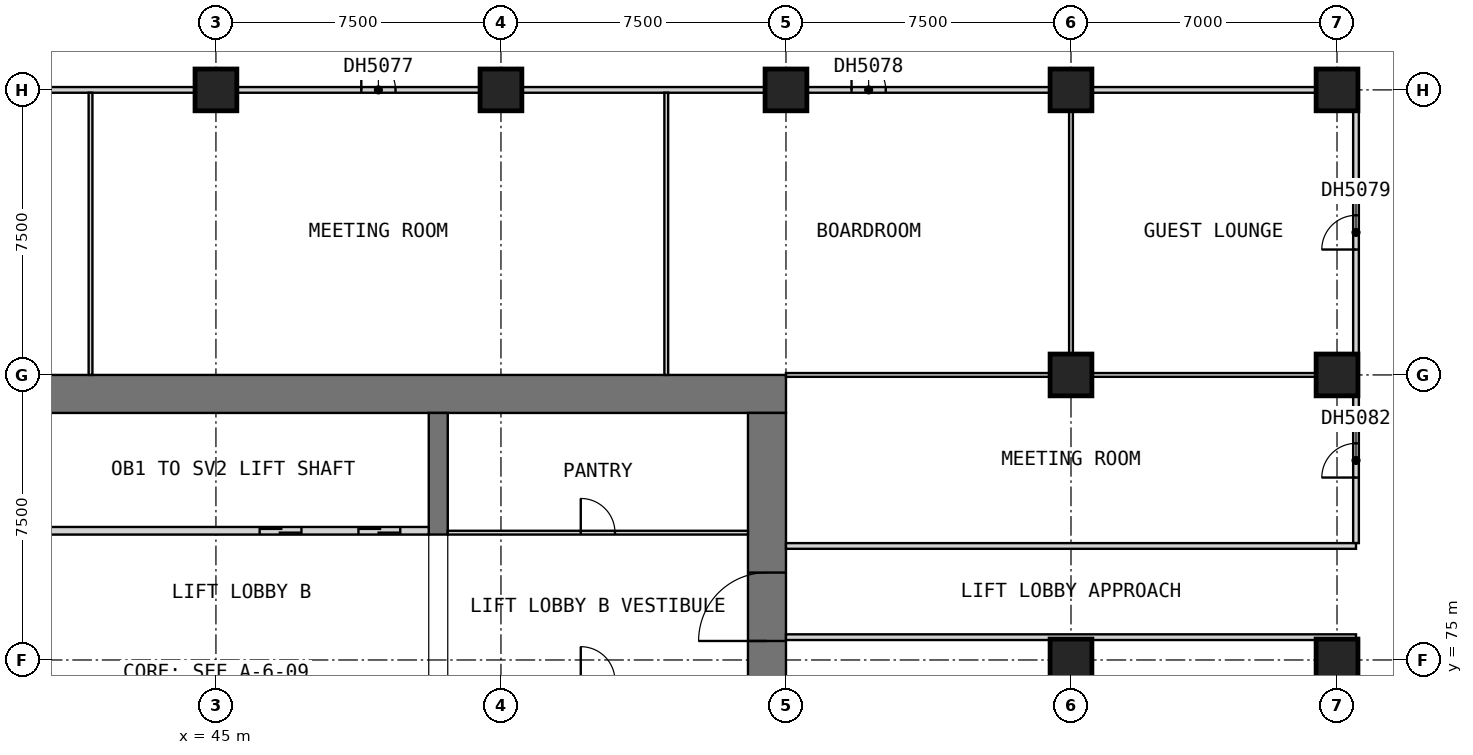
"""IFC4 building model, lengths in metres.
Left out: names, types, materials, properties, quantities, classifications, styles, units other than length and angle.
Written with IfcOpenShell. Run it as: python <this file> out.ifc"""

import sys

from ifc_helpers import new_model, si_unit, direction, frame, frame_2d, origin, origin_2d, place, context, subcontext, project, spatial, rectangle, extrude, element, fill, save


model = new_model("IFC4")
c1 = context("Model", 3, precision=1e-05, world=origin(), true_north=direction((0.0, 1.0)))
c2 = subcontext(c1, "Body", "Model", "MODEL_VIEW")
j1 = project(units=[si_unit("LENGTHUNIT", "METRE"), si_unit("PLANEANGLEUNIT", "RADIAN")], contexts=[c1])
p1 = place(None, origin())
s1 = spatial("IfcSite", under=j1, at=p1, CompositionType="ELEMENT")
p2 = place(p1, origin())
s2 = spatial("IfcBuilding", under=s1, at=p2, CompositionType="ELEMENT")
p3 = place(p2, frame((0.0, 0.0, 93.5)))
s3 = spatial("IfcBuildingStorey", under=s2, at=p3, CompositionType="ELEMENT", Elevation=93.5)
for number, where, z_axis, x_axis in (
    (1, (45.0, 90.0, 0.0), (0.0, 0.0, 1.0), (1.0, 0.0, 0.0)),
    (2, (52.5, 90.0, 0.0), (0.0, 0.0, 1.0), (1.0, 0.0, 0.0)),
    (3, (60.0, 90.0, 0.0), (0.0, 0.0, 1.0), (1.0, 0.0, 0.0)),
    (4, (67.5, 75.0, 0.0), (0.0, 0.0, 1.0), (1.0, 0.0, 0.0)),
    (5, (67.5, 82.5, 0.0), (0.0, 0.0, 1.0), (1.0, 0.0, 0.0)),
    (6, (67.5, 90.0, 0.0), (0.0, 0.0, 1.0), (1.0, 0.0, 0.0)),
    (7, (74.5, 75.0, 0.0), (0.0, 0.0, 1.0), (1.0, 0.0, 0.0)),
    (8, (74.5, 82.5, 0.0), (0.0, 0.0, 1.0), (1.0, 0.0, 0.0)),
    (9, (74.5, 90.0, 0.0), (0.0, 0.0, 1.0), (1.0, 0.0, 0.0)),
):
    element("IfcColumn", number, at=place(p3, frame(where, z_axis=z_axis, x_axis=x_axis)), inside=s3, PredefinedType="COLUMN", context=c2, shape_type="SweptSolid", body=[
        extrude(rectangle(XDim=1.1, YDim=1.1, at=origin_2d()), origin(), (0.0, 0.0, 1.0), 3.6),
    ])
p4 = place(p3, frame((30.0, 82.0, 0.0), z_axis=(0.0, 0.0, 1.0), x_axis=(1.0, 0.0, 0.0)))
e10 = element("IfcWall", 10, at=p4, inside=s3, PredefinedType="SHEAR", context=c2, shape_type="SweptSolid", body=[
    extrude(rectangle(XDim=30.0, YDim=1.0, at=frame_2d((15.0, 0.0))), origin(), (0.0, 0.0, 1.0), 3.6),
])
p5 = place(p3, frame((59.5, 61.0, 0.0), z_axis=(0.0, 0.0, 1.0), x_axis=(0.0, 1.0, 0.0)))
e11 = element("IfcWall", 11, at=p5, inside=s3, PredefinedType="SHEAR", context=c2, shape_type="SweptSolid", body=[
    extrude(rectangle(XDim=20.5, YDim=1.0, at=frame_2d((10.25, 0.0))), origin(), (0.0, 0.0, 1.0), 3.6),
])
p6 = place(p5, frame((14.5, 0.0, 0.0)))
e12 = element("IfcOpeningElement", 12, at=p6, cuts=e11, PredefinedType="OPENING", context=c2, shape_type="SweptSolid", body=[
    extrude(rectangle(XDim=1.8, YDim=2.1, at=frame_2d((0.9, 1.05))), frame((0.0, 0.51, 0.0), z_axis=(0.0, -1.0, 0.0), x_axis=(1.0, 0.0, 0.0)), (0.0, 0.0, 1.0), 1.02),
])
p7 = place(p3, frame((50.85, 78.3, 0.0), z_axis=(0.0, 0.0, 1.0), x_axis=(0.0, 1.0, 0.0)))
e13 = element("IfcWall", 13, at=p7, inside=s3, PredefinedType="SHEAR", context=c2, shape_type="SweptSolid", body=[
    extrude(rectangle(XDim=3.2, YDim=0.5, at=frame_2d((1.6, 0.0))), origin(), (0.0, 0.0, 1.0), 3.6),
])
p8 = place(p3, frame((35.0, 78.4, 0.0), z_axis=(0.0, 0.0, 1.0), x_axis=(1.0, 0.0, 0.0)))
e14 = element("IfcWall", 14, at=p8, inside=s3, PredefinedType="SOLIDWALL", context=c2, shape_type="SweptSolid", body=[
    extrude(rectangle(XDim=15.6, YDim=0.2, at=frame_2d((7.8, 0.0))), origin(), (0.0, 0.0, 1.0), 3.6),
])
p9 = place(p8, frame((0.75, 0.0, 0.0)))
e15 = element("IfcOpeningElement", 15, at=p9, cuts=e14, PredefinedType="OPENING", context=c2, shape_type="SweptSolid", body=[
    extrude(rectangle(XDim=1.1, YDim=2.1, at=frame_2d((0.55, 1.05))), frame((0.0, 0.11, 0.0), z_axis=(0.0, -1.0, 0.0), x_axis=(1.0, 0.0, 0.0)), (0.0, 0.0, 1.0), 0.22),
])
p10 = place(p8, frame((3.35, 0.0, 0.0)))
e16 = element("IfcOpeningElement", 16, at=p10, cuts=e14, PredefinedType="OPENING", context=c2, shape_type="SweptSolid", body=[
    extrude(rectangle(XDim=1.1, YDim=2.1, at=frame_2d((0.55, 1.05))), frame((0.0, 0.11, 0.0), z_axis=(0.0, -1.0, 0.0), x_axis=(1.0, 0.0, 0.0)), (0.0, 0.0, 1.0), 0.22),
])
p11 = place(p8, frame((11.15, 0.0, 0.0)))
e17 = element("IfcOpeningElement", 17, at=p11, cuts=e14, PredefinedType="OPENING", context=c2, shape_type="SweptSolid", body=[
    extrude(rectangle(XDim=1.1, YDim=2.1, at=frame_2d((0.55, 1.05))), frame((0.0, 0.11, 0.0), z_axis=(0.0, -1.0, 0.0), x_axis=(1.0, 0.0, 0.0)), (0.0, 0.0, 1.0), 0.22),
])
p12 = place(p8, frame((13.75, 0.0, 0.0)))
e18 = element("IfcOpeningElement", 18, at=p12, cuts=e14, PredefinedType="OPENING", context=c2, shape_type="SweptSolid", body=[
    extrude(rectangle(XDim=1.1, YDim=2.1, at=frame_2d((0.55, 1.05))), frame((0.0, 0.11, 0.0), z_axis=(0.0, -1.0, 0.0), x_axis=(1.0, 0.0, 0.0)), (0.0, 0.0, 1.0), 0.22),
])
p13 = place(p3, frame((51.1, 78.35, 0.0), z_axis=(0.0, 0.0, 1.0), x_axis=(1.0, 0.0, 0.0)))
e19 = element("IfcWall", 19, at=p13, inside=s3, PredefinedType="PARTITIONING", context=c2, shape_type="SweptSolid", body=[
    extrude(rectangle(XDim=7.9, YDim=0.1, at=frame_2d((3.95, 0.0))), origin(), (0.0, 0.0, 1.0), 3.35),
])
p14 = place(p13, frame((3.5, 0.0, 0.0)))
e20 = element("IfcOpeningElement", 20, at=p14, cuts=e19, PredefinedType="OPENING", context=c2, shape_type="SweptSolid", body=[
    extrude(rectangle(XDim=0.9, YDim=2.1, at=frame_2d((0.45, 1.05))), frame((0.0, 0.06, 0.0), z_axis=(0.0, -1.0, 0.0), x_axis=(1.0, 0.0, 0.0)), (0.0, 0.0, 1.0), 0.12),
])
p15 = place(p3, frame((33.75, 90.0, 0.0), z_axis=(0.0, 0.0, 1.0), x_axis=(1.0, 0.0, 0.0)))
e21 = element("IfcWall", 21, at=p15, inside=s3, PredefinedType="PARTITIONING", context=c2, shape_type="SweptSolid", body=[
    extrude(rectangle(XDim=41.25, YDim=0.15, at=frame_2d((20.625, 0.0))), origin(), (0.0, 0.0, 1.0), 3.35),
])
p16 = place(p15, frame((4.425, 0.0, 0.0)))
e22 = element("IfcOpeningElement", 22, at=p16, cuts=e21, PredefinedType="OPENING", context=c2, shape_type="SweptSolid", body=[
    extrude(rectangle(XDim=0.9, YDim=2.1, at=frame_2d((0.45, 1.05))), frame((0.0, 0.085, 0.0), z_axis=(0.0, -1.0, 0.0), x_axis=(1.0, 0.0, 0.0)), (0.0, 0.0, 1.0), 0.17),
])
p17 = place(p15, frame((15.075, 0.0, 0.0)))
e23 = element("IfcOpeningElement", 23, at=p17, cuts=e21, PredefinedType="OPENING", context=c2, shape_type="SweptSolid", body=[
    extrude(rectangle(XDim=0.9, YDim=2.1, at=frame_2d((0.45, 1.05))), frame((0.0, 0.085, 0.0), z_axis=(0.0, -1.0, 0.0), x_axis=(1.0, 0.0, 0.0)), (0.0, 0.0, 1.0), 0.17),
])
p18 = place(p15, frame((27.975, 0.0, 0.0)))
e24 = element("IfcOpeningElement", 24, at=p18, cuts=e21, PredefinedType="OPENING", context=c2, shape_type="SweptSolid", body=[
    extrude(rectangle(XDim=0.9, YDim=2.1, at=frame_2d((0.45, 1.05))), frame((0.0, 0.085, 0.0), z_axis=(0.0, -1.0, 0.0), x_axis=(1.0, 0.0, 0.0)), (0.0, 0.0, 1.0), 0.17),
])
p19 = place(p3, frame((75.0, 66.975, 0.0), z_axis=(0.0, 0.0, 1.0), x_axis=(0.0, 1.0, 0.0)))
e25 = element("IfcWall", 25, at=p19, inside=s3, PredefinedType="PARTITIONING", context=c2, shape_type="SweptSolid", body=[
    extrude(rectangle(XDim=8.55, YDim=0.15, at=frame_2d((4.275, 0.0))), origin(), (0.0, 0.0, 1.0), 3.35),
])
p20 = place(p19, frame((3.825, 0.0, 0.0)))
e26 = element("IfcOpeningElement", 26, at=p20, cuts=e25, PredefinedType="OPENING", context=c2, shape_type="SweptSolid", body=[
    extrude(rectangle(XDim=0.9, YDim=2.1, at=frame_2d((0.45, 1.05))), frame((0.0, 0.085, 0.0), z_axis=(0.0, -1.0, 0.0), x_axis=(1.0, 0.0, 0.0)), (0.0, 0.0, 1.0), 0.17),
])
p21 = place(p3, frame((75.0, 78.075, 0.0), z_axis=(0.0, 0.0, 1.0), x_axis=(0.0, 1.0, 0.0)))
e27 = element("IfcWall", 27, at=p21, inside=s3, PredefinedType="PARTITIONING", context=c2, shape_type="SweptSolid", body=[
    extrude(rectangle(XDim=11.85, YDim=0.15, at=frame_2d((5.925, 0.0))), origin(), (0.0, 0.0, 1.0), 3.35),
])
p22 = place(p21, frame((7.725, 0.0, 0.0)))
e28 = element("IfcOpeningElement", 28, at=p22, cuts=e27, PredefinedType="OPENING", context=c2, shape_type="SweptSolid", body=[
    extrude(rectangle(XDim=0.9, YDim=2.1, at=frame_2d((0.45, 1.05))), frame((0.0, 0.085, 0.0), z_axis=(0.0, -1.0, 0.0), x_axis=(1.0, 0.0, 0.0)), (0.0, 0.0, 1.0), 0.17),
])
p23 = place(p21, frame((1.725, 0.0, 0.0)))
e29 = element("IfcOpeningElement", 29, at=p23, cuts=e27, PredefinedType="OPENING", context=c2, shape_type="SweptSolid", body=[
    extrude(rectangle(XDim=0.9, YDim=2.1, at=frame_2d((0.45, 1.05))), frame((0.0, 0.085, 0.0), z_axis=(0.0, -1.0, 0.0), x_axis=(1.0, 0.0, 0.0)), (0.0, 0.0, 1.0), 0.17),
])
p24 = place(p3, frame((60.0, 82.5, 0.0), z_axis=(0.0, 0.0, 1.0), x_axis=(1.0, 0.0, 0.0)))
e30 = element("IfcWall", 30, at=p24, inside=s3, PredefinedType="PARTITIONING", context=c2, shape_type="SweptSolid", body=[
    extrude(rectangle(XDim=14.925, YDim=0.1, at=frame_2d((7.462, 0.0))), origin(), (0.0, 0.0, 1.0), 3.35),
])
for number, where, z_axis, x_axis in (
    (31, (41.7, 82.5, 0.0), (0.0, 0.0, 1.0), (0.0, 1.0, 0.0)),
    (32, (56.85, 82.5, 0.0), (0.0, 0.0, 1.0), (0.0, 1.0, 0.0)),
):
    element("IfcWall", number, at=place(p3, frame(where, z_axis=z_axis, x_axis=x_axis)), inside=s3, PredefinedType="PARTITIONING", context=c2, shape_type="SweptSolid", body=[
        extrude(rectangle(XDim=7.425, YDim=0.1, at=frame_2d((3.712, 0.0))), origin(), (0.0, 0.0, 1.0), 3.35),
    ])
p25 = place(p3, frame((67.5, 82.55, 0.0), z_axis=(0.0, 0.0, 1.0), x_axis=(0.0, 1.0, 0.0)))
e33 = element("IfcWall", 33, at=p25, inside=s3, PredefinedType="PARTITIONING", context=c2, shape_type="SweptSolid", body=[
    extrude(rectangle(XDim=7.375, YDim=0.1, at=frame_2d((3.688, 0.0))), origin(), (0.0, 0.0, 1.0), 3.35),
])
for number, where, z_axis, x_axis in (
    (34, (60.0, 75.6, 0.0), (0.0, 0.0, 1.0), (1.0, 0.0, 0.0)),
    (35, (60.0, 78.0, 0.0), (0.0, 0.0, 1.0), (1.0, 0.0, 0.0)),
):
    element("IfcWall", number, at=place(p3, frame(where, z_axis=z_axis, x_axis=x_axis)), inside=s3, PredefinedType="PARTITIONING", context=c2, shape_type="SweptSolid", body=[
        extrude(rectangle(XDim=15.0, YDim=0.15, at=frame_2d((7.5, 0.0))), origin(), (0.0, 0.0, 1.0), 3.35),
    ])
p26 = place(p11, origin())
e36 = element("IfcDoor", 36, at=p26, inside=s3, OperationType="DOUBLE_DOOR_SLIDING", PredefinedType="DOOR", context=c2, shape_type="SweptSolid", body=[
    extrude(rectangle(XDim=1.1, YDim=2.1, at=frame_2d((0.55, 1.05))), frame((0.0, 0.025, 0.0), z_axis=(0.0, -1.0, 0.0), x_axis=(1.0, 0.0, 0.0)), (0.0, 0.0, 1.0), 0.05),
])
fill(e17, e36)
p27 = place(p12, origin())
e37 = element("IfcDoor", 37, at=p27, inside=s3, OperationType="DOUBLE_DOOR_SLIDING", PredefinedType="DOOR", context=c2, shape_type="SweptSolid", body=[
    extrude(rectangle(XDim=1.1, YDim=2.1, at=frame_2d((0.55, 1.05))), frame((0.0, 0.025, 0.0), z_axis=(0.0, -1.0, 0.0), x_axis=(1.0, 0.0, 0.0)), (0.0, 0.0, 1.0), 0.05),
])
fill(e18, e37)
p28 = place(p6, origin())
e38 = element("IfcDoor", 38, at=p28, inside=s3, OperationType="DOUBLE_DOOR_SINGLE_SWING", PredefinedType="DOOR", context=c2, shape_type="SweptSolid", body=[
    extrude(rectangle(XDim=1.8, YDim=2.1, at=frame_2d((0.9, 1.05))), frame((0.0, 0.025, 0.0), z_axis=(0.0, -1.0, 0.0), x_axis=(1.0, 0.0, 0.0)), (0.0, 0.0, 1.0), 0.05),
])
fill(e12, e38)
p29 = place(p14, origin())
e39 = element("IfcDoor", 39, at=p29, inside=s3, OperationType="SINGLE_SWING_RIGHT", PredefinedType="DOOR", context=c2, shape_type="SweptSolid", body=[
    extrude(rectangle(XDim=0.9, YDim=2.1, at=frame_2d((0.45, 1.05))), frame((0.0, 0.025, 0.0), z_axis=(0.0, -1.0, 0.0), x_axis=(1.0, 0.0, 0.0)), (0.0, 0.0, 1.0), 0.05),
])
fill(e20, e39)
p30 = place(p17, origin())
e40 = element("IfcDoor", 40, at=p30, inside=s3, OperationType="SINGLE_SWING_RIGHT", PredefinedType="DOOR", context=c2, shape_type="SweptSolid", body=[
    extrude(rectangle(XDim=0.9, YDim=2.1, at=frame_2d((0.45, 1.05))), frame((0.0, 0.025, 0.0), z_axis=(0.0, -1.0, 0.0), x_axis=(1.0, 0.0, 0.0)), (0.0, 0.0, 1.0), 0.05),
])
fill(e23, e40)
p31 = place(p18, origin())
e41 = element("IfcDoor", 41, at=p31, inside=s3, OperationType="SINGLE_SWING_RIGHT", PredefinedType="DOOR", context=c2, shape_type="SweptSolid", body=[
    extrude(rectangle(XDim=0.9, YDim=2.1, at=frame_2d((0.45, 1.05))), frame((0.0, 0.025, 0.0), z_axis=(0.0, -1.0, 0.0), x_axis=(1.0, 0.0, 0.0)), (0.0, 0.0, 1.0), 0.05),
])
fill(e24, e41)
p32 = place(p22, origin())
e42 = element("IfcDoor", 42, at=p32, inside=s3, OperationType="SINGLE_SWING_LEFT", PredefinedType="DOOR", context=c2, shape_type="SweptSolid", body=[
    extrude(rectangle(XDim=0.9, YDim=2.1, at=frame_2d((0.45, 1.05))), frame((0.0, 0.025, 0.0), z_axis=(0.0, -1.0, 0.0), x_axis=(1.0, 0.0, 0.0)), (0.0, 0.0, 1.0), 0.05),
])
fill(e28, e42)
p33 = place(p23, origin())
e43 = element("IfcDoor", 43, at=p33, inside=s3, OperationType="SINGLE_SWING_LEFT", PredefinedType="DOOR", context=c2, shape_type="SweptSolid", body=[
    extrude(rectangle(XDim=0.9, YDim=2.1, at=frame_2d((0.45, 1.05))), frame((0.0, 0.025, 0.0), z_axis=(0.0, -1.0, 0.0), x_axis=(1.0, 0.0, 0.0)), (0.0, 0.0, 1.0), 0.05),
])
fill(e29, e43)
save(model, sys.argv[1])
